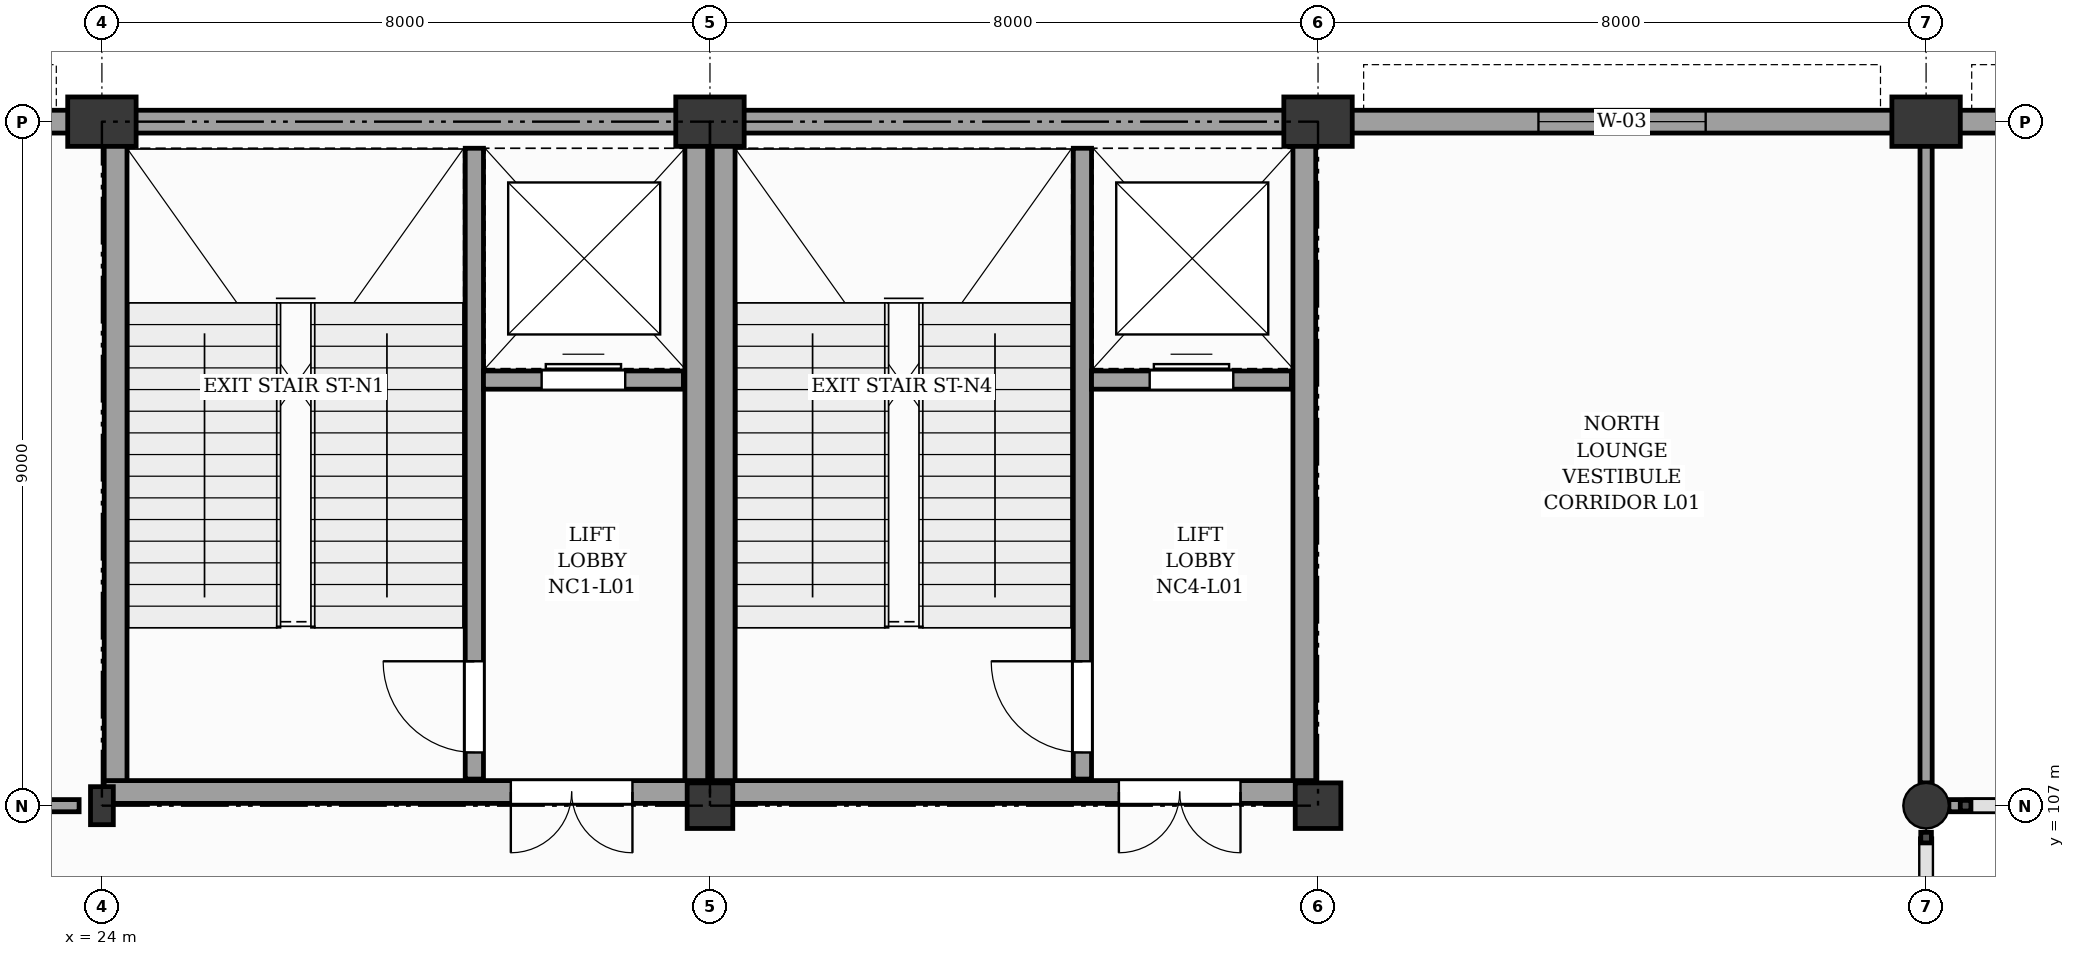
"""IFC4 building model, lengths in metres.
Left out: names, types, materials, properties, quantities, classifications, styles, units other than length and angle.
Written with IfcOpenShell. Run it as: python <this file> out.ifc"""

import sys

from ifc_helpers import new_model, si_unit, direction, frame, frame_2d, origin, origin_2d, place, context, subcontext, project, spatial, rectangle, circle, i_section, extrude, element, fill, save


model = new_model("IFC4")
c1 = context("Model", 3, precision=1e-05, world=origin(), true_north=direction((0.0, 1.0)))
c2 = subcontext(c1, "Body", "Model", "MODEL_VIEW")
j1 = project(units=[si_unit("LENGTHUNIT", "METRE"), si_unit("PLANEANGLEUNIT", "RADIAN")], contexts=[c1])
p1 = place(None, origin())
s1 = spatial("IfcSite", under=j1, at=p1, CompositionType="ELEMENT")
p2 = place(p1, origin())
s2 = spatial("IfcBuilding", under=s1, at=p2, CompositionType="ELEMENT")
p3 = place(p2, frame((0.0, 0.0, 4.8)))
s3 = spatial("IfcBuildingStorey", under=s2, at=p3, CompositionType="ELEMENT", Elevation=4.8)
p4 = place(p3, frame((24.0, 107.0, 0.0), z_axis=(0.0, 0.0, 1.0), x_axis=(1.0, 0.0, 0.0)))
e1 = element("IfcColumn", 1, at=p4, inside=s3, PredefinedType="COLUMN", context=c2, shape_type="SweptSolid", body=[
    extrude(i_section(OverallWidth=0.3, OverallDepth=0.5, WebThickness=0.014, FlangeThickness=0.028, FilletRadius=0.027, at=origin_2d()), origin(), (0.0, 0.0, 1.0), 4.8),
])
p5 = place(p3, frame((24.0, 116.0, 0.0), z_axis=(0.0, 0.0, 1.0), x_axis=(1.0, 0.0, 0.0)))
e2 = element("IfcColumn", 2, at=p5, inside=s3, PredefinedType="PILASTER", context=c2, shape_type="SweptSolid", body=[
    extrude(rectangle(XDim=0.9, YDim=0.65, at=origin_2d()), origin(), (0.0, 0.0, 1.0), 4.8),
])
p6 = place(p3, frame((32.0, 107.0, 0.0), z_axis=(0.0, 0.0, 1.0), x_axis=(1.0, 0.0, 0.0)))
e3 = element("IfcColumn", 3, at=p6, inside=s3, PredefinedType="COLUMN", context=c2, shape_type="SweptSolid", body=[
    extrude(rectangle(XDim=0.6, YDim=0.6, at=origin_2d()), origin(), (0.0, 0.0, 1.0), 4.8),
])
p7 = place(p3, frame((32.0, 116.0, 0.0), z_axis=(0.0, 0.0, 1.0), x_axis=(1.0, 0.0, 0.0)))
e4 = element("IfcColumn", 4, at=p7, inside=s3, PredefinedType="PILASTER", context=c2, shape_type="SweptSolid", body=[
    extrude(rectangle(XDim=0.9, YDim=0.65, at=origin_2d()), origin(), (0.0, 0.0, 1.0), 4.8),
])
p8 = place(p3, frame((40.0, 107.0, 0.0), z_axis=(0.0, 0.0, 1.0), x_axis=(1.0, 0.0, 0.0)))
e5 = element("IfcColumn", 5, at=p8, inside=s3, PredefinedType="COLUMN", context=c2, shape_type="SweptSolid", body=[
    extrude(rectangle(XDim=0.6, YDim=0.6, at=origin_2d()), origin(), (0.0, 0.0, 1.0), 4.8),
])
p9 = place(p3, frame((40.0, 116.0, 0.0), z_axis=(0.0, 0.0, 1.0), x_axis=(1.0, 0.0, 0.0)))
e6 = element("IfcColumn", 6, at=p9, inside=s3, PredefinedType="PILASTER", context=c2, shape_type="SweptSolid", body=[
    extrude(rectangle(XDim=0.9, YDim=0.65, at=origin_2d()), origin(), (0.0, 0.0, 1.0), 4.8),
])
p10 = place(p3, frame((48.0, 107.0, 0.0), z_axis=(0.0, 0.0, 1.0), x_axis=(1.0, 0.0, 0.0)))
e7 = element("IfcColumn", 7, at=p10, inside=s3, PredefinedType="COLUMN", context=c2, shape_type="SweptSolid", body=[
    extrude(circle(Radius=0.3, at=origin_2d()), origin(), (0.0, 0.0, 1.0), 4.8),
])
p11 = place(p3, frame((48.0, 116.0, 0.0), z_axis=(0.0, 0.0, 1.0), x_axis=(1.0, 0.0, 0.0)))
e8 = element("IfcColumn", 8, at=p11, inside=s3, PredefinedType="PILASTER", context=c2, shape_type="SweptSolid", body=[
    extrude(rectangle(XDim=0.9, YDim=0.65, at=origin_2d()), origin(), (0.0, 0.0, 1.0), 4.8),
])
p12 = place(p3, frame((16.4, 116.0, 0.0), z_axis=(0.0, 0.0, 1.0), x_axis=(1.0, 0.0, 0.0)))
e9 = element("IfcWall", 9, at=p12, inside=s3, PredefinedType="SOLIDWALL", context=c2, shape_type="SweptSolid", body=[
    extrude(rectangle(XDim=7.2, YDim=0.3, at=frame_2d((3.6, 0.0))), origin(), (0.0, 0.0, 1.0), 3.84),
])
p13 = place(p12, frame((2.5, 0.0, 0.9)))
e10 = element("IfcOpeningElement", 10, at=p13, cuts=e9, PredefinedType="OPENING", context=c2, shape_type="SweptSolid", body=[
    extrude(rectangle(XDim=2.2, YDim=2.2, at=frame_2d((1.1, 1.1))), frame((0.0, 0.16, 0.0), z_axis=(0.0, -1.0, 0.0), x_axis=(1.0, 0.0, 0.0)), (0.0, 0.0, 1.0), 0.32),
])
for number, where, z_axis, x_axis in (
    (11, (24.4, 116.0, 0.0), (0.0, 0.0, 1.0), (1.0, 0.0, 0.0)),
    (12, (32.4, 116.0, 0.0), (0.0, 0.0, 1.0), (1.0, 0.0, 0.0)),
):
    element("IfcWall", number, at=place(p3, frame(where, z_axis=z_axis, x_axis=x_axis)), inside=s3, PredefinedType="SOLIDWALL", context=c2, shape_type="SweptSolid", body=[
        extrude(rectangle(XDim=7.2, YDim=0.3, at=frame_2d((3.6, 0.0))), origin(), (0.0, 0.0, 1.0), 3.84),
    ])
p14 = place(p3, frame((40.4, 116.0, 0.0), z_axis=(0.0, 0.0, 1.0), x_axis=(1.0, 0.0, 0.0)))
e13 = element("IfcWall", 13, at=p14, inside=s3, PredefinedType="SOLIDWALL", context=c2, shape_type="SweptSolid", body=[
    extrude(rectangle(XDim=7.2, YDim=0.3, at=frame_2d((3.6, 0.0))), origin(), (0.0, 0.0, 1.0), 3.84),
])
p15 = place(p14, frame((2.5, 0.0, 0.9)))
e14 = element("IfcOpeningElement", 14, at=p15, cuts=e13, PredefinedType="OPENING", context=c2, shape_type="SweptSolid", body=[
    extrude(rectangle(XDim=2.2, YDim=2.2, at=frame_2d((1.1, 1.1))), frame((0.0, 0.16, 0.0), z_axis=(0.0, -1.0, 0.0), x_axis=(1.0, 0.0, 0.0)), (0.0, 0.0, 1.0), 0.32),
])
p16 = place(p3, frame((48.4, 116.0, 0.0), z_axis=(0.0, 0.0, 1.0), x_axis=(1.0, 0.0, 0.0)))
e15 = element("IfcWall", 15, at=p16, inside=s3, PredefinedType="SOLIDWALL", context=c2, shape_type="SweptSolid", body=[
    extrude(rectangle(XDim=7.2, YDim=0.3, at=frame_2d((3.6, 0.0))), origin(), (0.0, 0.0, 1.0), 3.84),
])
p17 = place(p16, frame((2.5, 0.0, 0.9)))
e16 = element("IfcOpeningElement", 16, at=p17, cuts=e15, PredefinedType="OPENING", context=c2, shape_type="SweptSolid", body=[
    extrude(rectangle(XDim=2.2, YDim=2.2, at=frame_2d((1.1, 1.1))), frame((0.0, 0.16, 0.0), z_axis=(0.0, -1.0, 0.0), x_axis=(1.0, 0.0, 0.0)), (0.0, 0.0, 1.0), 0.32),
])
p18 = place(p3, frame((28.9, 107.35, 0.0), z_axis=(0.0, 0.0, 1.0), x_axis=(0.0, 1.0, 0.0)))
e17 = element("IfcWall", 17, at=p18, inside=s3, PredefinedType="SHEAR", context=c2, shape_type="SweptSolid", body=[
    extrude(rectangle(XDim=8.3, YDim=0.24, at=frame_2d((4.15, 0.0))), origin(), (0.0, 0.0, 1.0), 4.52),
])
p19 = place(p18, frame((0.35, 0.0, 0.0)))
e18 = element("IfcOpeningElement", 18, at=p19, cuts=e17, PredefinedType="OPENING", context=c2, shape_type="SweptSolid", body=[
    extrude(rectangle(XDim=1.2, YDim=2.15, at=frame_2d((0.6, 1.075))), frame((0.0, 0.13, 0.0), z_axis=(0.0, -1.0, 0.0), x_axis=(1.0, 0.0, 0.0)), (0.0, 0.0, 1.0), 0.26),
])
p20 = place(p3, frame((29.02, 112.6, 0.0), z_axis=(0.0, 0.0, 1.0), x_axis=(1.0, 0.0, 0.0)))
e19 = element("IfcWall", 19, at=p20, inside=s3, PredefinedType="SHEAR", context=c2, shape_type="SweptSolid", body=[
    extrude(rectangle(XDim=2.63, YDim=0.24, at=frame_2d((1.315, 0.0))), origin(), (0.0, 0.0, 1.0), 4.52),
])
p21 = place(p20, frame((0.765, 0.0, 0.0)))
e20 = element("IfcOpeningElement", 20, at=p21, cuts=e19, PredefinedType="OPENING", context=c2, shape_type="SweptSolid", body=[
    extrude(rectangle(XDim=1.1, YDim=2.15, at=frame_2d((0.55, 1.075))), frame((0.0, 0.13, 0.0), z_axis=(0.0, -1.0, 0.0), x_axis=(1.0, 0.0, 0.0)), (0.0, 0.0, 1.0), 0.26),
])
for number, where, z_axis, x_axis in (
    (21, (24.18, 107.18, 0.0), (0.0, 0.0, 1.0), (0.0, 1.0, 0.0)),
    (22, (31.82, 107.18, 0.0), (0.0, 0.0, 1.0), (0.0, 1.0, 0.0)),
):
    element("IfcWall", number, at=place(p3, frame(where, z_axis=z_axis, x_axis=x_axis)), inside=s3, PredefinedType="SHEAR", context=c2, shape_type="SweptSolid", body=[
        extrude(rectangle(XDim=8.64, YDim=0.3, at=frame_2d((4.32, 0.0))), origin(), (0.0, 0.0, 1.0), 4.52),
    ])
p22 = place(p3, frame((24.03, 107.18, 0.0), z_axis=(0.0, 0.0, 1.0), x_axis=(1.0, 0.0, 0.0)))
e23 = element("IfcWall", 23, at=p22, inside=s3, PredefinedType="SHEAR", context=c2, shape_type="SweptSolid", body=[
    extrude(rectangle(XDim=7.94, YDim=0.3, at=frame_2d((3.97, 0.0))), origin(), (0.0, 0.0, 1.0), 4.52),
])
p23 = place(p22, frame((5.35, 0.0, 0.0)))
e24 = element("IfcOpeningElement", 24, at=p23, cuts=e23, PredefinedType="OPENING", context=c2, shape_type="SweptSolid", body=[
    extrude(rectangle(XDim=1.6, YDim=2.15, at=frame_2d((0.8, 1.075))), frame((0.0, 0.16, 0.0), z_axis=(0.0, -1.0, 0.0), x_axis=(1.0, 0.0, 0.0)), (0.0, 0.0, 1.0), 0.32),
])
p24 = place(p3, frame((36.9, 107.35, 0.0), z_axis=(0.0, 0.0, 1.0), x_axis=(0.0, 1.0, 0.0)))
e25 = element("IfcWall", 25, at=p24, inside=s3, PredefinedType="SHEAR", context=c2, shape_type="SweptSolid", body=[
    extrude(rectangle(XDim=8.3, YDim=0.24, at=frame_2d((4.15, 0.0))), origin(), (0.0, 0.0, 1.0), 4.52),
])
p25 = place(p24, frame((0.35, 0.0, 0.0)))
e26 = element("IfcOpeningElement", 26, at=p25, cuts=e25, PredefinedType="OPENING", context=c2, shape_type="SweptSolid", body=[
    extrude(rectangle(XDim=1.2, YDim=2.15, at=frame_2d((0.6, 1.075))), frame((0.0, 0.13, 0.0), z_axis=(0.0, -1.0, 0.0), x_axis=(1.0, 0.0, 0.0)), (0.0, 0.0, 1.0), 0.26),
])
p26 = place(p3, frame((37.02, 112.6, 0.0), z_axis=(0.0, 0.0, 1.0), x_axis=(1.0, 0.0, 0.0)))
e27 = element("IfcWall", 27, at=p26, inside=s3, PredefinedType="SHEAR", context=c2, shape_type="SweptSolid", body=[
    extrude(rectangle(XDim=2.63, YDim=0.24, at=frame_2d((1.315, 0.0))), origin(), (0.0, 0.0, 1.0), 4.52),
])
p27 = place(p26, frame((0.765, 0.0, 0.0)))
e28 = element("IfcOpeningElement", 28, at=p27, cuts=e27, PredefinedType="OPENING", context=c2, shape_type="SweptSolid", body=[
    extrude(rectangle(XDim=1.1, YDim=2.15, at=frame_2d((0.55, 1.075))), frame((0.0, 0.13, 0.0), z_axis=(0.0, -1.0, 0.0), x_axis=(1.0, 0.0, 0.0)), (0.0, 0.0, 1.0), 0.26),
])
for number, where, z_axis, x_axis in (
    (29, (32.18, 107.18, 0.0), (0.0, 0.0, 1.0), (0.0, 1.0, 0.0)),
    (30, (39.82, 107.18, 0.0), (0.0, 0.0, 1.0), (0.0, 1.0, 0.0)),
):
    element("IfcWall", number, at=place(p3, frame(where, z_axis=z_axis, x_axis=x_axis)), inside=s3, PredefinedType="SHEAR", context=c2, shape_type="SweptSolid", body=[
        extrude(rectangle(XDim=8.64, YDim=0.3, at=frame_2d((4.32, 0.0))), origin(), (0.0, 0.0, 1.0), 4.52),
    ])
p28 = place(p3, frame((32.03, 107.18, 0.0), z_axis=(0.0, 0.0, 1.0), x_axis=(1.0, 0.0, 0.0)))
e31 = element("IfcWall", 31, at=p28, inside=s3, PredefinedType="SHEAR", context=c2, shape_type="SweptSolid", body=[
    extrude(rectangle(XDim=7.94, YDim=0.3, at=frame_2d((3.97, 0.0))), origin(), (0.0, 0.0, 1.0), 4.52),
])
p29 = place(p28, frame((5.35, 0.0, 0.0)))
e32 = element("IfcOpeningElement", 32, at=p29, cuts=e31, PredefinedType="OPENING", context=c2, shape_type="SweptSolid", body=[
    extrude(rectangle(XDim=1.6, YDim=2.15, at=frame_2d((0.8, 1.075))), frame((0.0, 0.16, 0.0), z_axis=(0.0, -1.0, 0.0), x_axis=(1.0, 0.0, 0.0)), (0.0, 0.0, 1.0), 0.32),
])
p30 = place(p3, frame((16.3, 107.0, 0.0), z_axis=(0.0, 0.0, 1.0), x_axis=(1.0, 0.0, 0.0)))
e33 = element("IfcWall", 33, at=p30, inside=s3, PredefinedType="PARTITIONING", context=c2, shape_type="SweptSolid", body=[
    extrude(rectangle(XDim=7.4, YDim=0.16, at=frame_2d((3.7, 0.0))), origin(), (0.0, 0.0, 1.0), 3.7),
])
p31 = place(p30, frame((2.8, 0.0, 0.0)))
e34 = element("IfcOpeningElement", 34, at=p31, cuts=e33, PredefinedType="OPENING", context=c2, shape_type="SweptSolid", body=[
    extrude(rectangle(XDim=1.8, YDim=2.25, at=frame_2d((0.9, 1.125))), frame((0.0, 0.09, 0.0), z_axis=(0.0, -1.0, 0.0), x_axis=(1.0, 0.0, 0.0)), (0.0, 0.0, 1.0), 0.18),
])
p32 = place(p3, frame((48.3, 107.0, 0.0), z_axis=(0.0, 0.0, 1.0), x_axis=(1.0, 0.0, 0.0)))
e35 = element("IfcWall", 35, at=p32, inside=s3, PredefinedType="PARTITIONING", context=c2, shape_type="SweptSolid", body=[
    extrude(rectangle(XDim=7.4, YDim=0.16, at=frame_2d((3.7, 0.0))), origin(), (0.0, 0.0, 1.0), 3.7),
])
p33 = place(p3, frame((48.0, 107.3, 0.0), z_axis=(0.0, 0.0, 1.0), x_axis=(0.0, 1.0, 0.0)))
e36 = element("IfcWall", 36, at=p33, inside=s3, PredefinedType="PARTITIONING", context=c2, shape_type="SweptSolid", body=[
    extrude(rectangle(XDim=8.4, YDim=0.16, at=frame_2d((4.2, 0.0))), origin(), (0.0, 0.0, 1.0), 3.7),
])
p34 = place(p15, origin())
e37 = element("IfcWindow", 37, at=p34, inside=s3, PartitioningType="SINGLE_PANEL", PredefinedType="WINDOW", context=c2, shape_type="SweptSolid", body=[
    extrude(rectangle(XDim=2.2, YDim=2.2, at=frame_2d((1.1, 1.1))), frame((0.0, 0.03, 0.0), z_axis=(0.0, -1.0, 0.0), x_axis=(1.0, 0.0, 0.0)), (0.0, 0.0, 1.0), 0.06),
])
fill(e14, e37)
p35 = place(p19, origin())
e38 = element("IfcDoor", 38, at=p35, inside=s3, OperationType="SINGLE_SWING_RIGHT", PredefinedType="DOOR", context=c2, shape_type="SweptSolid", body=[
    extrude(rectangle(XDim=1.2, YDim=2.15, at=frame_2d((0.6, 1.075))), frame((0.0, 0.025, 0.0), z_axis=(0.0, -1.0, 0.0), x_axis=(1.0, 0.0, 0.0)), (0.0, 0.0, 1.0), 0.05),
])
fill(e18, e38)
p36 = place(p21, origin())
e39 = element("IfcDoor", 39, at=p36, inside=s3, OperationType="DOUBLE_DOOR_SLIDING", PredefinedType="DOOR", context=c2, shape_type="SweptSolid", body=[
    extrude(rectangle(XDim=1.1, YDim=2.15, at=frame_2d((0.55, 1.075))), frame((0.0, 0.025, 0.0), z_axis=(0.0, -1.0, 0.0), x_axis=(1.0, 0.0, 0.0)), (0.0, 0.0, 1.0), 0.05),
])
fill(e20, e39)
p37 = place(p23, frame((1.6, 0.0, 0.0), z_axis=(0.0, 0.0, 1.0), x_axis=(-1.0, 0.0, 0.0)))
e40 = element("IfcDoor", 40, at=p37, inside=s3, OperationType="DOUBLE_DOOR_SINGLE_SWING", PredefinedType="DOOR", context=c2, shape_type="SweptSolid", body=[
    extrude(rectangle(XDim=1.6, YDim=2.15, at=frame_2d((0.8, 1.075))), frame((0.0, 0.025, 0.0), z_axis=(0.0, -1.0, 0.0), x_axis=(1.0, 0.0, 0.0)), (0.0, 0.0, 1.0), 0.05),
])
fill(e24, e40)
p38 = place(p25, origin())
e41 = element("IfcDoor", 41, at=p38, inside=s3, OperationType="SINGLE_SWING_RIGHT", PredefinedType="DOOR", context=c2, shape_type="SweptSolid", body=[
    extrude(rectangle(XDim=1.2, YDim=2.15, at=frame_2d((0.6, 1.075))), frame((0.0, 0.025, 0.0), z_axis=(0.0, -1.0, 0.0), x_axis=(1.0, 0.0, 0.0)), (0.0, 0.0, 1.0), 0.05),
])
fill(e26, e41)
p39 = place(p27, origin())
e42 = element("IfcDoor", 42, at=p39, inside=s3, OperationType="DOUBLE_DOOR_SLIDING", PredefinedType="DOOR", context=c2, shape_type="SweptSolid", body=[
    extrude(rectangle(XDim=1.1, YDim=2.15, at=frame_2d((0.55, 1.075))), frame((0.0, 0.025, 0.0), z_axis=(0.0, -1.0, 0.0), x_axis=(1.0, 0.0, 0.0)), (0.0, 0.0, 1.0), 0.05),
])
fill(e28, e42)
p40 = place(p29, frame((1.6, 0.0, 0.0), z_axis=(0.0, 0.0, 1.0), x_axis=(-1.0, 0.0, 0.0)))
e43 = element("IfcDoor", 43, at=p40, inside=s3, OperationType="DOUBLE_DOOR_SINGLE_SWING", PredefinedType="DOOR", context=c2, shape_type="SweptSolid", body=[
    extrude(rectangle(XDim=1.6, YDim=2.15, at=frame_2d((0.8, 1.075))), frame((0.0, 0.025, 0.0), z_axis=(0.0, -1.0, 0.0), x_axis=(1.0, 0.0, 0.0)), (0.0, 0.0, 1.0), 0.05),
])
fill(e32, e43)
save(model, sys.argv[1])
